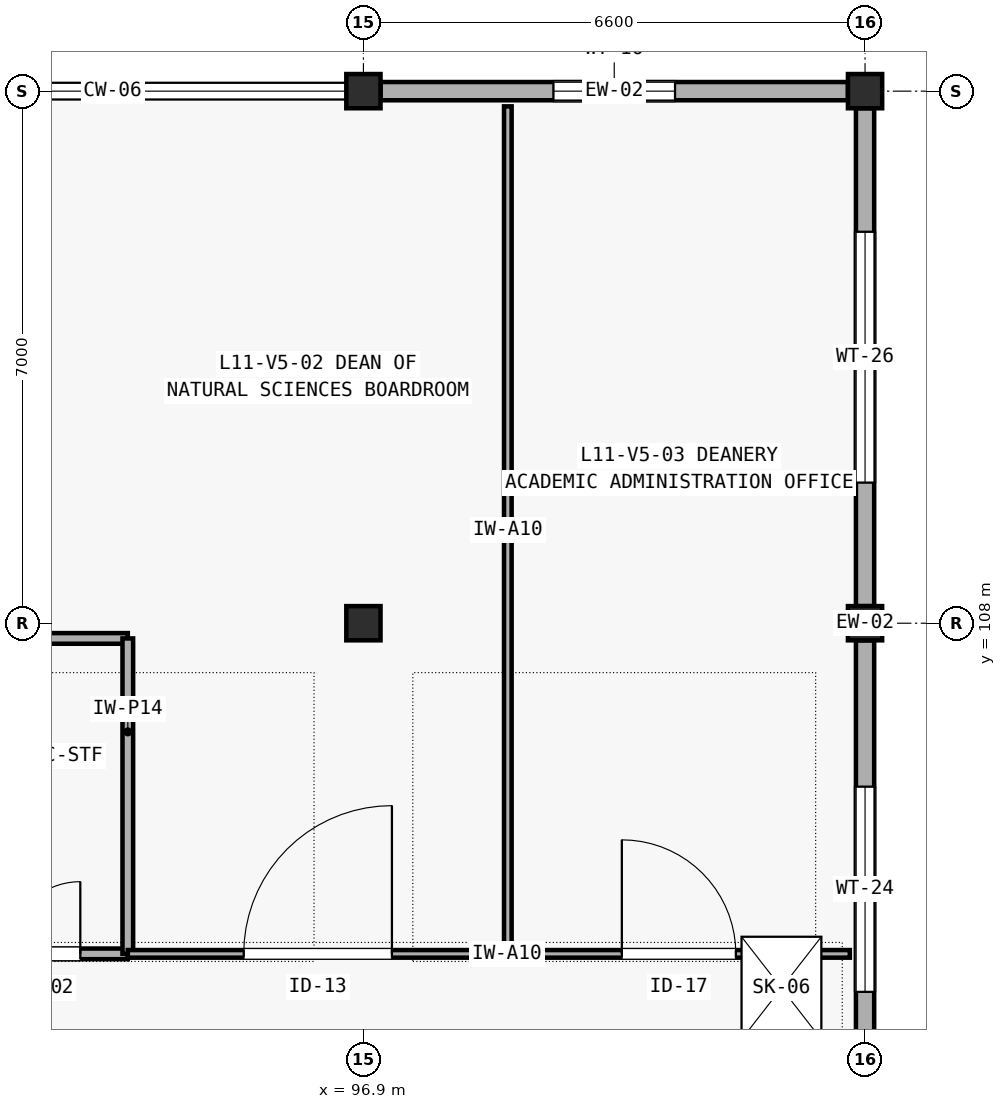
"""IFC4 building model, lengths in metres.
Left out: names, types, materials, properties, quantities, classifications, styles, units other than length and angle.
Written with IfcOpenShell. Run it as: python <this file> out.ifc"""

import sys

from ifc_helpers import new_model, si_unit, direction, frame, frame_2d, origin, origin_2d, place, context, subcontext, project, spatial, rectangle, extrude, element, fill, save


model = new_model("IFC4")
c1 = context("Model", 3, precision=1e-05, world=origin(), true_north=direction((0.0, 1.0)))
c2 = subcontext(c1, "Body", "Model", "MODEL_VIEW")
j1 = project(units=[si_unit("LENGTHUNIT", "METRE"), si_unit("PLANEANGLEUNIT", "RADIAN")], contexts=[c1])
p1 = place(None, origin())
s1 = spatial("IfcSite", under=j1, at=p1, CompositionType="ELEMENT")
p2 = place(p1, origin())
s2 = spatial("IfcBuilding", under=s1, at=p2, CompositionType="ELEMENT")
p3 = place(p2, frame((0.0, 0.0, 46.2)))
s3 = spatial("IfcBuildingStorey", under=s2, at=p3, CompositionType="ELEMENT", Elevation=46.2)
for number, where, z_axis, x_axis in (
    (1, (96.9, 108.0, 0.0), (0.0, 0.0, 1.0), (1.0, 0.0, 0.0)),
    (2, (96.9, 115.0, 0.0), (0.0, 0.0, 1.0), (1.0, 0.0, 0.0)),
    (3, (103.5, 108.0, 0.0), (0.0, 0.0, 1.0), (1.0, 0.0, 0.0)),
    (4, (103.5, 115.0, 0.0), (0.0, 0.0, 1.0), (1.0, 0.0, 0.0)),
):
    element("IfcColumn", number, at=place(p3, frame(where, z_axis=z_axis, x_axis=x_axis)), inside=s3, PredefinedType="COLUMN", context=c2, shape_type="SweptSolid", body=[
        extrude(rectangle(XDim=0.45, YDim=0.45, at=origin_2d()), origin(), (0.0, 0.0, 1.0), 4.2),
    ])
p4 = place(p3, frame((97.125, 115.0, 0.0), z_axis=(0.0, 0.0, 1.0), x_axis=(1.0, 0.0, 0.0)))
e5 = element("IfcWall", 5, at=p4, inside=s3, PredefinedType="SOLIDWALL", context=c2, shape_type="SweptSolid", body=[
    extrude(rectangle(XDim=6.15, YDim=0.24, at=frame_2d((3.075, 0.0))), origin(), (0.0, 0.0, 1.0), 3.235),
])
p5 = place(p4, frame((2.275, 0.0, 0.85)))
e6 = element("IfcOpeningElement", 6, at=p5, cuts=e5, PredefinedType="OPENING", context=c2, shape_type="SweptSolid", body=[
    extrude(rectangle(XDim=1.6, YDim=1.25, at=frame_2d((0.8, 0.625))), frame((0.0, 0.13, 0.0), z_axis=(0.0, -1.0, 0.0), x_axis=(1.0, 0.0, 0.0)), (0.0, 0.0, 1.0), 0.26),
])
p6 = place(p3, frame((103.5, 101.225, 0.0), z_axis=(0.0, 0.0, 1.0), x_axis=(0.0, 1.0, 0.0)))
e7 = element("IfcWall", 7, at=p6, inside=s3, PredefinedType="SOLIDWALL", context=c2, shape_type="SweptSolid", body=[
    extrude(rectangle(XDim=6.55, YDim=0.24, at=frame_2d((3.275, 0.0))), origin(), (0.0, 0.0, 1.0), 3.247),
])
p7 = place(p6, frame((1.925, 0.0, 0.85)))
e8 = element("IfcOpeningElement", 8, at=p7, cuts=e7, PredefinedType="OPENING", context=c2, shape_type="SweptSolid", body=[
    extrude(rectangle(XDim=2.7, YDim=1.6, at=frame_2d((1.35, 0.8))), frame((0.0, 0.13, 0.0), z_axis=(0.0, -1.0, 0.0), x_axis=(1.0, 0.0, 0.0)), (0.0, 0.0, 1.0), 0.26),
])
p8 = place(p3, frame((103.5, 108.225, 0.0), z_axis=(0.0, 0.0, 1.0), x_axis=(0.0, 1.0, 0.0)))
e9 = element("IfcWall", 9, at=p8, inside=s3, PredefinedType="SOLIDWALL", context=c2, shape_type="SweptSolid", body=[
    extrude(rectangle(XDim=6.55, YDim=0.24, at=frame_2d((3.275, 0.0))), origin(), (0.0, 0.0, 1.0), 3.313),
])
p9 = place(p8, frame((1.625, 0.0, 0.85)))
e10 = element("IfcOpeningElement", 10, at=p9, cuts=e9, PredefinedType="OPENING", context=c2, shape_type="SweptSolid", body=[
    extrude(rectangle(XDim=3.3, YDim=1.6, at=frame_2d((1.65, 0.8))), frame((0.0, 0.13, 0.0), z_axis=(0.0, -1.0, 0.0), x_axis=(1.0, 0.0, 0.0)), (0.0, 0.0, 1.0), 0.26),
])
p10 = place(p3, frame((91.6, 103.65, 0.0), z_axis=(0.0, 0.0, 1.0), x_axis=(1.0, 0.0, 0.0)))
e11 = element("IfcWall", 11, at=p10, inside=s3, PredefinedType="PLUMBINGWALL", context=c2, shape_type="SweptSolid", body=[
    extrude(rectangle(XDim=2.2, YDim=0.14, at=frame_2d((1.1, 0.0))), origin(), (0.0, 0.0, 1.0), 3.9),
])
p11 = place(p10, frame((0.625, 0.0, 0.0)))
e12 = element("IfcOpeningElement", 12, at=p11, cuts=e11, PredefinedType="OPENING", context=c2, shape_type="SweptSolid", body=[
    extrude(rectangle(XDim=0.95, YDim=2.1, at=frame_2d((0.475, 1.05))), frame((0.0, 0.08, 0.0), z_axis=(0.0, -1.0, 0.0), x_axis=(1.0, 0.0, 0.0)), (0.0, 0.0, 1.0), 0.16),
])
p12 = place(p3, frame((91.6, 107.8, 0.0), z_axis=(0.0, 0.0, 1.0), x_axis=(1.0, 0.0, 0.0)))
e13 = element("IfcWall", 13, at=p12, inside=s3, PredefinedType="PLUMBINGWALL", context=c2, shape_type="SweptSolid", body=[
    extrude(rectangle(XDim=2.2, YDim=0.14, at=frame_2d((1.1, 0.0))), origin(), (0.0, 0.0, 1.0), 3.135),
])
p13 = place(p3, frame((93.8, 103.65, 0.0), z_axis=(0.0, 0.0, 1.0), x_axis=(0.0, 1.0, 0.0)))
e14 = element("IfcWall", 14, at=p13, inside=s3, PredefinedType="PLUMBINGWALL", context=c2, shape_type="SweptSolid", body=[
    extrude(rectangle(XDim=4.15, YDim=0.14, at=frame_2d((2.075, 0.0))), origin(), (0.0, 0.0, 1.0), 3.9),
])
p14 = place(p3, frame((93.8, 103.65, 0.0), z_axis=(0.0, 0.0, 1.0), x_axis=(1.0, 0.0, 0.0)))
e15 = element("IfcWall", 15, at=p14, inside=s3, PredefinedType="PARTITIONING", context=c2, shape_type="SweptSolid", body=[
    extrude(rectangle(XDim=5.0, YDim=0.1, at=frame_2d((2.5, 0.0))), origin(), (0.0, 0.0, 1.0), 3.9),
])
p15 = place(p14, frame((1.525, 0.0, 0.0)))
e16 = element("IfcOpeningElement", 16, at=p15, cuts=e15, PredefinedType="OPENING", context=c2, shape_type="SweptSolid", body=[
    extrude(rectangle(XDim=1.95, YDim=2.3, at=frame_2d((0.975, 1.15))), frame((0.0, 0.06, 0.0), z_axis=(0.0, -1.0, 0.0), x_axis=(1.0, 0.0, 0.0)), (0.0, 0.0, 1.0), 0.12),
])
p16 = place(p3, frame((98.8, 103.65, 0.0), z_axis=(0.0, 0.0, 1.0), x_axis=(0.0, 1.0, 0.0)))
e17 = element("IfcWall", 17, at=p16, inside=s3, PredefinedType="PARTITIONING", context=c2, shape_type="SweptSolid", body=[
    extrude(rectangle(XDim=11.15, YDim=0.1, at=frame_2d((5.575, 0.0))), origin(), (0.0, 0.0, 1.0), 3.9),
])
p17 = place(p3, frame((98.8, 103.65, 0.0), z_axis=(0.0, 0.0, 1.0), x_axis=(1.0, 0.0, 0.0)))
e18 = element("IfcWall", 18, at=p17, inside=s3, PredefinedType="PARTITIONING", context=c2, shape_type="SweptSolid", body=[
    extrude(rectangle(XDim=4.5, YDim=0.1, at=frame_2d((2.25, 0.0))), origin(), (0.0, 0.0, 1.0), 3.9),
])
p18 = place(p17, frame((1.5, 0.0, 0.0)))
e19 = element("IfcOpeningElement", 19, at=p18, cuts=e18, PredefinedType="OPENING", context=c2, shape_type="SweptSolid", body=[
    extrude(rectangle(XDim=1.5, YDim=2.15, at=frame_2d((0.75, 1.075))), frame((0.0, 0.06, 0.0), z_axis=(0.0, -1.0, 0.0), x_axis=(1.0, 0.0, 0.0)), (0.0, 0.0, 1.0), 0.12),
])
p19 = place(p5, origin())
e20 = element("IfcWindow", 20, at=p19, inside=s3, PartitioningType="SINGLE_PANEL", PredefinedType="WINDOW", context=c2, shape_type="SweptSolid", body=[
    extrude(rectangle(XDim=1.6, YDim=1.25, at=frame_2d((0.8, 0.625))), frame((0.0, 0.03, 0.0), z_axis=(0.0, -1.0, 0.0), x_axis=(1.0, 0.0, 0.0)), (0.0, 0.0, 1.0), 0.06),
])
fill(e6, e20)
p20 = place(p7, origin())
e21 = element("IfcWindow", 21, at=p20, inside=s3, PartitioningType="SINGLE_PANEL", PredefinedType="WINDOW", context=c2, shape_type="SweptSolid", body=[
    extrude(rectangle(XDim=2.7, YDim=1.6, at=frame_2d((1.35, 0.8))), frame((0.0, 0.03, 0.0), z_axis=(0.0, -1.0, 0.0), x_axis=(1.0, 0.0, 0.0)), (0.0, 0.0, 1.0), 0.06),
])
fill(e8, e21)
p21 = place(p9, origin())
e22 = element("IfcWindow", 22, at=p21, inside=s3, PartitioningType="SINGLE_PANEL", PredefinedType="WINDOW", context=c2, shape_type="SweptSolid", body=[
    extrude(rectangle(XDim=3.3, YDim=1.6, at=frame_2d((1.65, 0.8))), frame((0.0, 0.03, 0.0), z_axis=(0.0, -1.0, 0.0), x_axis=(1.0, 0.0, 0.0)), (0.0, 0.0, 1.0), 0.06),
])
fill(e10, e22)
p22 = place(p2, frame((0.0, 0.0, 50.4)))
p23 = place(p22, frame((0.0, 0.0, -0.26)))
p24 = place(p23, frame((102.4, 103.2, 0.21)))
e23 = element("IfcWindow", 23, at=p24, inside=s3, PartitioningType="SINGLE_PANEL", PredefinedType="SKYLIGHT", context=c2, shape_type="SweptSolid", body=[
    extrude(rectangle(XDim=1.05, YDim=1.35, at=origin_2d()), origin(), (0.0, 0.0, 1.0), 0.05),
])
p25 = place(p11, origin())
e24 = element("IfcDoor", 24, at=p25, inside=s3, OperationType="SINGLE_SWING_RIGHT", PredefinedType="DOOR", context=c2, shape_type="SweptSolid", body=[
    extrude(rectangle(XDim=0.95, YDim=2.1, at=frame_2d((0.475, 1.05))), frame((0.0, 0.025, 0.0), z_axis=(0.0, -1.0, 0.0), x_axis=(1.0, 0.0, 0.0)), (0.0, 0.0, 1.0), 0.05),
])
fill(e12, e24)
p26 = place(p15, origin())
e25 = element("IfcDoor", 25, at=p26, inside=s3, OperationType="SINGLE_SWING_RIGHT", PredefinedType="DOOR", context=c2, shape_type="SweptSolid", body=[
    extrude(rectangle(XDim=1.95, YDim=2.3, at=frame_2d((0.975, 1.15))), frame((0.0, 0.025, 0.0), z_axis=(0.0, -1.0, 0.0), x_axis=(1.0, 0.0, 0.0)), (0.0, 0.0, 1.0), 0.05),
])
fill(e16, e25)
p27 = place(p18, origin())
e26 = element("IfcDoor", 26, at=p27, inside=s3, OperationType="SINGLE_SWING_LEFT", PredefinedType="DOOR", context=c2, shape_type="SweptSolid", body=[
    extrude(rectangle(XDim=1.5, YDim=2.15, at=frame_2d((0.75, 1.075))), frame((0.0, 0.025, 0.0), z_axis=(0.0, -1.0, 0.0), x_axis=(1.0, 0.0, 0.0)), (0.0, 0.0, 1.0), 0.05),
])
fill(e19, e26)
save(model, sys.argv[1])
